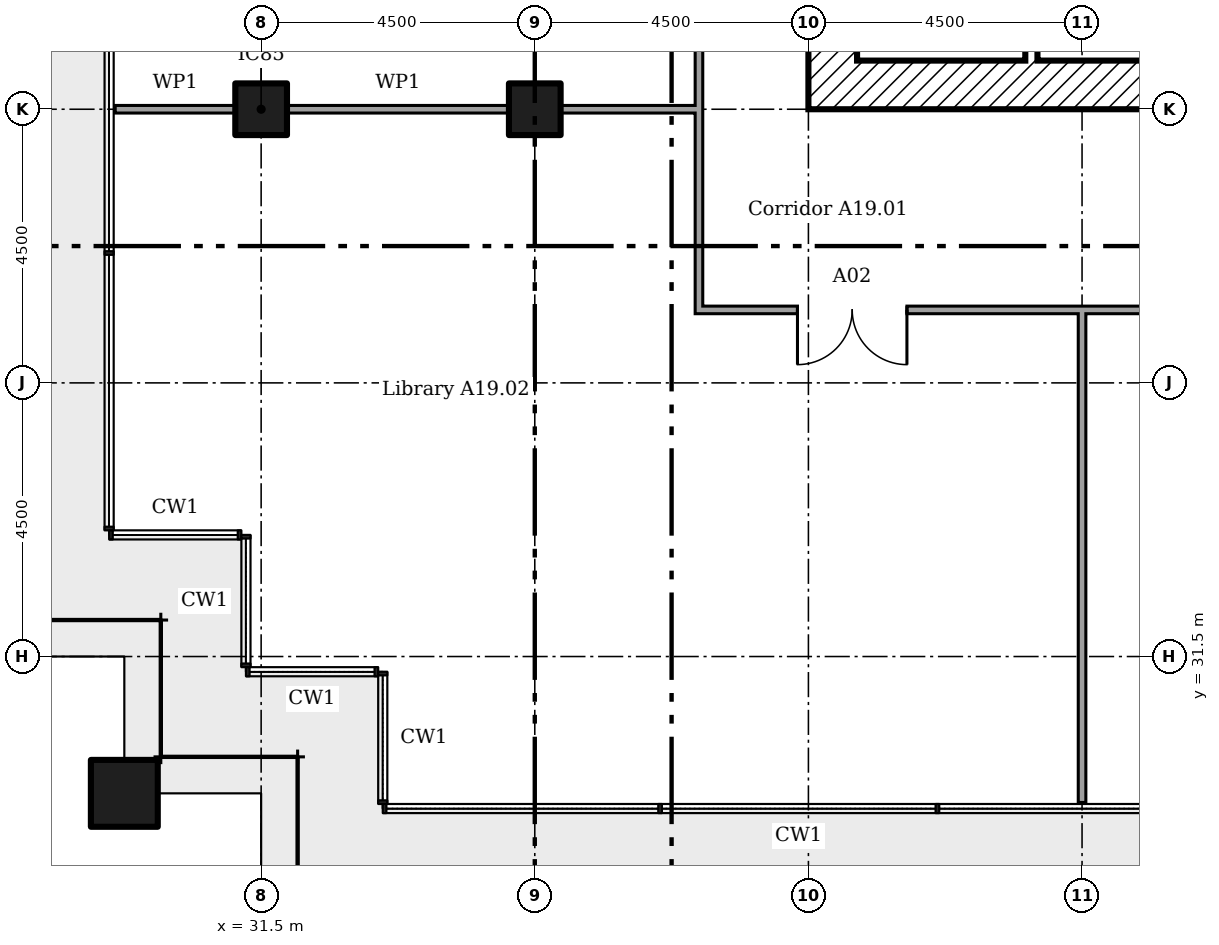
"""IFC4 building model, lengths in metres.
Left out: names, types, materials, properties, quantities, classifications, styles, units other than length and angle.
Written with IfcOpenShell. Run it as: python <this file> out.ifc"""

import sys

from ifc_helpers import new_model, si_unit, direction, frame, frame_2d, origin, origin_2d, place, context, subcontext, project, spatial, rectangle, extrude, element, fill, save


model = new_model("IFC4")
c1 = context("Model", 3, precision=1e-05, world=origin(), true_north=direction((0.0, 1.0)))
c2 = subcontext(c1, "Body", "Model", "MODEL_VIEW")
j1 = project(units=[si_unit("LENGTHUNIT", "METRE"), si_unit("PLANEANGLEUNIT", "RADIAN")], contexts=[c1])
p1 = place(None, origin())
s1 = spatial("IfcSite", under=j1, at=p1, CompositionType="ELEMENT")
p2 = place(p1, origin())
s2 = spatial("IfcBuilding", under=s1, at=p2, CompositionType="ELEMENT")
p3 = place(p2, frame((0.0, 0.0, 79.8)))
s3 = spatial("IfcBuildingStorey", under=s2, at=p3, CompositionType="ELEMENT", Elevation=79.8)
p4 = place(p3, frame((29.25, 29.25, 0.0)))
e1 = element("IfcColumn", 1, at=p4, inside=s3, PredefinedType="COLUMN", context=c2, shape_type="SweptSolid", body=[
    extrude(rectangle(XDim=1.1, YDim=1.1, at=origin_2d()), origin(), (0.0, 0.0, 1.0), 3.6),
])
for number, where in (
    (2, (31.5, 40.5, 0.0)),
    (3, (36.0, 40.5, 0.0)),
):
    element("IfcColumn", number, at=place(p3, frame(where)), inside=s3, PredefinedType="COLUMN", context=c2, shape_type="SweptSolid", body=[
        extrude(rectangle(XDim=0.85, YDim=0.85, at=origin_2d()), origin(), (0.0, 0.0, 1.0), 3.6),
    ])
p5 = place(p3, frame((41.3, 40.9, 0.0)))
e4 = element("IfcWall", 4, at=p5, inside=s3, PredefinedType="SHEAR", context=c2, shape_type="SweptSolid", body=[
    extrude(rectangle(XDim=16.4, YDim=0.8, at=frame_2d((8.2, 0.0))), origin(), (0.0, 0.0, 1.0), 3.35),
])
p6 = place(p3, frame((40.9, 40.5, 0.0), z_axis=(0.0, 0.0, 1.0), x_axis=(0.0, 1.0, 0.0)))
e5 = element("IfcWall", 5, at=p6, inside=s3, PredefinedType="SHEAR", context=c2, shape_type="SweptSolid", body=[
    extrude(rectangle(XDim=18.0, YDim=0.8, at=frame_2d((9.0, 0.0))), origin(), (0.0, 0.0, 1.0), 3.35),
])
p7 = place(p6, frame((3.65, 0.0, 0.0)))
e6 = element("IfcOpeningElement", 6, at=p7, cuts=e5, PredefinedType="OPENING", context=c2, shape_type="SweptSolid", body=[
    extrude(rectangle(XDim=1.2, YDim=2.1, at=frame_2d((0.6, 1.05))), frame((0.0, 0.41, 0.0), z_axis=(0.0, -1.0, 0.0), x_axis=(1.0, 0.0, 0.0)), (0.0, 0.0, 1.0), 0.82),
])
p8 = place(p6, frame((5.475, 0.0, 0.0)))
e7 = element("IfcOpeningElement", 7, at=p8, cuts=e5, PredefinedType="OPENING", context=c2, shape_type="SweptSolid", body=[
    extrude(rectangle(XDim=1.0, YDim=2.1, at=frame_2d((0.5, 1.05))), frame((0.0, 0.41, 0.0), z_axis=(0.0, -1.0, 0.0), x_axis=(1.0, 0.0, 0.0)), (0.0, 0.0, 1.0), 0.82),
])
p9 = place(p6, frame((12.3, 0.0, 0.0)))
e8 = element("IfcOpeningElement", 8, at=p9, cuts=e5, PredefinedType="OPENING", context=c2, shape_type="SweptSolid", body=[
    extrude(rectangle(XDim=1.0, YDim=2.1, at=frame_2d((0.5, 1.05))), frame((0.0, 0.41, 0.0), z_axis=(0.0, -1.0, 0.0), x_axis=(1.0, 0.0, 0.0)), (0.0, 0.0, 1.0), 0.82),
])
p10 = place(p3, frame((44.167, 41.3, 0.0), z_axis=(0.0, 0.0, 1.0), x_axis=(0.0, 1.0, 0.0)))
e9 = element("IfcWall", 9, at=p10, inside=s3, PredefinedType="SHEAR", context=c2, shape_type="SweptSolid", body=[
    extrude(rectangle(XDim=2.5, YDim=0.2, at=frame_2d((1.25, 0.0))), origin(), (0.0, 0.0, 1.0), 3.35),
])
p11 = place(p3, frame((38.637, 37.2, 0.0)))
e10 = element("IfcWall", 10, at=p11, inside=s3, PredefinedType="PARTITIONING", context=c2, shape_type="SweptSolid", body=[
    extrude(rectangle(XDim=23.225, YDim=0.125, at=frame_2d((11.613, 0.0))), origin(), (0.0, 0.0, 1.0), 3.45),
])
p12 = place(p11, frame((1.683, 0.0, 0.0)))
e11 = element("IfcOpeningElement", 11, at=p12, cuts=e10, PredefinedType="OPENING", context=c2, shape_type="SweptSolid", body=[
    extrude(rectangle(XDim=1.8, YDim=2.1, at=frame_2d((0.9, 1.05))), frame((0.0, 0.073, 0.0), z_axis=(0.0, -1.0, 0.0), x_axis=(1.0, 0.0, 0.0)), (0.0, 0.0, 1.0), 0.145),
])
p13 = place(p11, frame((14.103, 0.0, 0.0)))
e12 = element("IfcOpeningElement", 12, at=p13, cuts=e10, PredefinedType="OPENING", context=c2, shape_type="SweptSolid", body=[
    extrude(rectangle(XDim=1.8, YDim=2.1, at=frame_2d((0.9, 1.05))), frame((0.0, 0.073, 0.0), z_axis=(0.0, -1.0, 0.0), x_axis=(1.0, 0.0, 0.0)), (0.0, 0.0, 1.0), 0.145),
])
p14 = place(p11, frame((20.613, 0.0, 0.0)))
e13 = element("IfcOpeningElement", 13, at=p14, cuts=e10, PredefinedType="OPENING", context=c2, shape_type="SweptSolid", body=[
    extrude(rectangle(XDim=1.8, YDim=2.1, at=frame_2d((0.9, 1.05))), frame((0.0, 0.073, 0.0), z_axis=(0.0, -1.0, 0.0), x_axis=(1.0, 0.0, 0.0)), (0.0, 0.0, 1.0), 0.145),
])
p15 = place(p3, frame((29.1, 40.5, 0.0)))
e14 = element("IfcWall", 14, at=p15, inside=s3, PredefinedType="PARTITIONING", context=c2, shape_type="SweptSolid", body=[
    extrude(rectangle(XDim=1.975, YDim=0.125, at=frame_2d((0.987, 0.0))), origin(), (0.0, 0.0, 1.0), 2.676),
])
p16 = place(p3, frame((31.925, 40.5, 0.0)))
e15 = element("IfcWall", 15, at=p16, inside=s3, PredefinedType="PARTITIONING", context=c2, shape_type="SweptSolid", body=[
    extrude(rectangle(XDim=3.65, YDim=0.125, at=frame_2d((1.825, 0.0))), origin(), (0.0, 0.0, 1.0), 2.676),
])
p17 = place(p3, frame((36.425, 40.5, 0.0)))
e16 = element("IfcWall", 16, at=p17, inside=s3, PredefinedType="PARTITIONING", context=c2, shape_type="SweptSolid", body=[
    extrude(rectangle(XDim=2.275, YDim=0.125, at=frame_2d((1.137, 0.0))), origin(), (0.0, 0.0, 1.0), 2.676),
])
p18 = place(p3, frame((38.7, 37.262, 0.0), z_axis=(0.0, 0.0, 1.0), x_axis=(0.0, 1.0, 0.0)))
e17 = element("IfcWall", 17, at=p18, inside=s3, PredefinedType="PARTITIONING", context=c2, shape_type="SweptSolid", body=[
    extrude(rectangle(XDim=24.475, YDim=0.125, at=frame_2d((12.238, 0.0))), origin(), (0.0, 0.0, 1.0), 3.45),
])
p19 = place(p18, frame((4.988, 0.0, 0.0)))
e18 = element("IfcOpeningElement", 18, at=p19, cuts=e17, PredefinedType="OPENING", context=c2, shape_type="SweptSolid", body=[
    extrude(rectangle(XDim=1.0, YDim=2.1, at=frame_2d((0.5, 1.05))), frame((0.0, 0.073, 0.0), z_axis=(0.0, -1.0, 0.0), x_axis=(1.0, 0.0, 0.0)), (0.0, 0.0, 1.0), 0.145),
])
p20 = place(p18, frame((21.988, 0.0, 0.0)))
e19 = element("IfcOpeningElement", 19, at=p20, cuts=e17, PredefinedType="OPENING", context=c2, shape_type="SweptSolid", body=[
    extrude(rectangle(XDim=1.8, YDim=2.1, at=frame_2d((0.9, 1.05))), frame((0.0, 0.073, 0.0), z_axis=(0.0, -1.0, 0.0), x_axis=(1.0, 0.0, 0.0)), (0.0, 0.0, 1.0), 0.145),
])
p21 = place(p18, frame((18.032, 0.0, 0.0)))
e20 = element("IfcOpeningElement", 20, at=p21, cuts=e17, PredefinedType="OPENING", context=c2, shape_type="SweptSolid", body=[
    extrude(rectangle(XDim=1.0, YDim=2.1, at=frame_2d((0.5, 1.05))), frame((0.0, 0.073, 0.0), z_axis=(0.0, -1.0, 0.0), x_axis=(1.0, 0.0, 0.0)), (0.0, 0.0, 1.0), 0.145),
])
p22 = place(p18, frame((12.979, 0.0, 0.0)))
e21 = element("IfcOpeningElement", 21, at=p22, cuts=e17, PredefinedType="OPENING", context=c2, shape_type="SweptSolid", body=[
    extrude(rectangle(XDim=1.0, YDim=2.1, at=frame_2d((0.5, 1.05))), frame((0.0, 0.073, 0.0), z_axis=(0.0, -1.0, 0.0), x_axis=(1.0, 0.0, 0.0)), (0.0, 0.0, 1.0), 0.145),
])
p23 = place(p3, frame((45.0, 29.1, 0.0), z_axis=(0.0, 0.0, 1.0), x_axis=(0.0, 1.0, 0.0)))
e22 = element("IfcWall", 22, at=p23, inside=s3, PredefinedType="PARTITIONING", context=c2, shape_type="SweptSolid", body=[
    extrude(rectangle(XDim=8.1, YDim=0.125, at=frame_2d((4.05, 0.0))), origin(), (0.0, 0.0, 1.0), 2.766),
])
p24 = place(p12, frame((1.8, 0.0, 0.0), x_axis=(-1.0, 0.0, 0.0)))
e23 = element("IfcDoor", 23, at=p24, inside=s3, OperationType="DOUBLE_DOOR_SINGLE_SWING", PredefinedType="DOOR", context=c2, shape_type="SweptSolid", body=[
    extrude(rectangle(XDim=1.8, YDim=2.1, at=frame_2d((0.9, 1.05))), frame((0.0, 0.025, 0.0), z_axis=(0.0, -1.0, 0.0), x_axis=(1.0, 0.0, 0.0)), (0.0, 0.0, 1.0), 0.05),
])
fill(e11, e23)
save(model, sys.argv[1])
